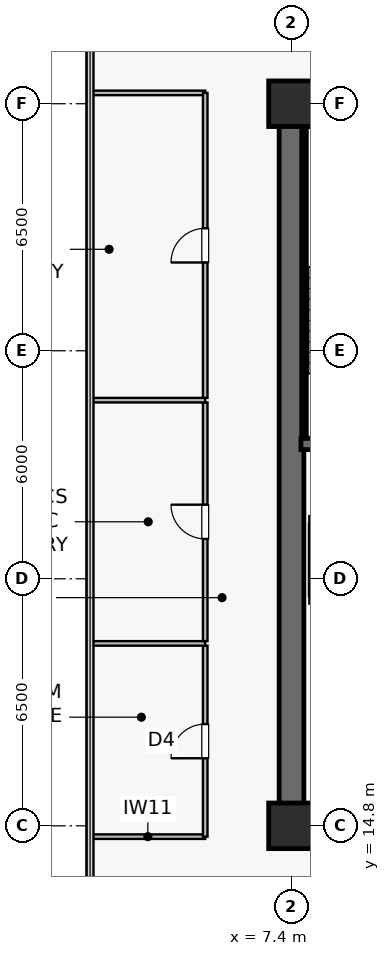
"""IFC4 building model, lengths in metres.
Left out: names, types, materials, properties, quantities, classifications, styles, units other than length and angle.
Written with IfcOpenShell. Run it as: python <this file> out.ifc"""

import sys

from ifc_helpers import new_model, si_unit, direction, frame, frame_2d, origin, origin_2d, place, context, subcontext, project, spatial, rectangle, extrude, source, transform, mapped, element, fill, save


model = new_model("IFC4")
c1 = context("Model", 3, precision=1e-05, world=origin(), true_north=direction((0.0, 1.0)))
c2 = subcontext(c1, "Body", "Model", "MODEL_VIEW")
j1 = project(units=[si_unit("LENGTHUNIT", "METRE"), si_unit("PLANEANGLEUNIT", "RADIAN")], contexts=[c1])
p1 = place(None, origin())
s1 = spatial("IfcSite", under=j1, at=p1, CompositionType="ELEMENT")
p2 = place(p1, origin())
s2 = spatial("IfcBuilding", under=s1, at=p2, CompositionType="ELEMENT")
p3 = place(p2, frame((0.0, 0.0, 178.9)))
s3 = spatial("IfcBuildingStorey", under=s2, at=p3, CompositionType="ELEMENT", Elevation=178.9)
p4 = place(p3, frame((7.075, 14.8, 0.0), z_axis=(0.0, 0.0, 1.0), x_axis=(1.0, 0.0, 0.0)))
e1 = element("IfcWall", 1, at=p4, inside=s3, PredefinedType="SHEAR", context=c2, shape_type="SweptSolid", body=[
    extrude(rectangle(XDim=15.45, YDim=0.65, at=frame_2d((7.725, 0.0))), origin(), (0.0, 0.0, 1.0), 3.79),
])
p5 = place(p3, frame((7.075, 33.8, 0.0), z_axis=(0.0, 0.0, 1.0), x_axis=(1.0, 0.0, 0.0)))
e2 = element("IfcWall", 2, at=p5, inside=s3, PredefinedType="SHEAR", context=c2, shape_type="SweptSolid", body=[
    extrude(rectangle(XDim=15.45, YDim=0.65, at=frame_2d((7.725, 0.0))), origin(), (0.0, 0.0, 1.0), 3.79),
])
p6 = place(p5, frame((6.825, 0.0, 0.0)))
e3 = element("IfcOpeningElement", 3, at=p6, cuts=e2, PredefinedType="OPENING", context=c2, shape_type="SweptSolid", body=[
    extrude(rectangle(XDim=0.95, YDim=2.15, at=frame_2d((0.475, 1.075))), frame((0.0, 0.335, 0.0), z_axis=(0.0, -1.0, 0.0), x_axis=(1.0, 0.0, 0.0)), (0.0, 0.0, 1.0), 0.67),
])
p7 = place(p5, frame((11.89, 0.0, 0.0)))
e4 = element("IfcOpeningElement", 4, at=p7, cuts=e2, PredefinedType="OPENING", context=c2, shape_type="SweptSolid", body=[
    extrude(rectangle(XDim=0.95, YDim=2.15, at=frame_2d((0.475, 1.075))), frame((0.0, 0.335, 0.0), z_axis=(0.0, -1.0, 0.0), x_axis=(1.0, 0.0, 0.0)), (0.0, 0.0, 1.0), 0.67),
])
p8 = place(p3, frame((7.4, 15.125, 0.0), z_axis=(0.0, 0.0, 1.0), x_axis=(0.0, 1.0, 0.0)))
e5 = element("IfcWall", 5, at=p8, inside=s3, PredefinedType="SHEAR", context=c2, shape_type="SweptSolid", body=[
    extrude(rectangle(XDim=18.35, YDim=0.65, at=frame_2d((9.175, 0.0))), origin(), (0.0, 0.0, 1.0), 3.79),
])
p9 = place(p3, frame((7.65, 24.85, 0.0), z_axis=(0.0, 0.0, 1.0), x_axis=(1.0, 0.0, 0.0)))
e6 = element("IfcWall", 6, at=p9, inside=s3, PredefinedType="SHEAR", context=c2, shape_type="SweptSolid", body=[
    extrude(rectangle(XDim=3.8, YDim=0.3, at=frame_2d((1.9, 0.0))), origin(), (0.0, 0.0, 1.0), 3.79),
])
p10 = place(p3, frame((7.73, 33.4, 0.0), z_axis=(0.0, 0.0, 1.0), x_axis=(1.0, 0.0, 0.0)))
e7 = element("IfcWall", 7, at=p10, inside=s3, PredefinedType="SOLIDWALL", context=c2, shape_type="SweptSolid", body=[
    extrude(rectangle(XDim=3.72, YDim=0.12, at=frame_2d((1.86, 0.0))), origin(), (0.0, 0.0, 1.0), 3.79),
])
p11 = place(p3, frame((7.73, 25.0, 0.0), z_axis=(0.0, 0.0, 1.0), x_axis=(0.0, 1.0, 0.0)))
e8 = element("IfcWall", 8, at=p11, inside=s3, PredefinedType="SOLIDWALL", context=c2, shape_type="SweptSolid", body=[
    extrude(rectangle(XDim=8.32, YDim=0.12, at=frame_2d((4.16, 0.0))), origin(), (0.0, 0.0, 1.0), 3.79),
])
m1 = source(origin(), c2, "Body", "SweptSolid", [
    extrude(rectangle(XDim=1.2, YDim=1.2, at=origin_2d()), origin(), (0.0, 0.0, 1.0), 4.1),
])
for number, where, z_axis, x_axis in (
    (9, (7.4, 14.8, 0.0), (0.0, 0.0, 1.0), (1.0, 0.0, 0.0)),
    (10, (7.4, 33.8, 0.0), (0.0, 0.0, 1.0), (1.0, 0.0, 0.0)),
):
    element("IfcColumn", number, at=place(p3, frame(where, z_axis=z_axis, x_axis=x_axis)), inside=s3, PredefinedType="COLUMN", context=c2, shape_type="MappedRepresentation", body=[
        mapped(m1, transform((0.0, 0.0, 0.0), scale=1.0)),
    ])
for number, where, z_axis, x_axis in (
    (11, (7.87, 20.75, 0.0), (0.0, 0.0, 1.0), (1.0, 0.0, 0.0)),
    (12, (7.87, 22.85, 0.0), (0.0, 0.0, 1.0), (1.0, 0.0, 0.0)),
):
    element("IfcWall", number, at=place(p3, frame(where, z_axis=z_axis, x_axis=x_axis)), inside=s3, PredefinedType="SOLIDWALL", context=c2, shape_type="SweptSolid", body=[
        extrude(rectangle(XDim=2.26, YDim=0.2, at=frame_2d((1.13, 0.0))), origin(), (0.0, 0.0, 1.0), 3.79),
    ])
p12 = place(p3, frame((7.95, 20.85, 0.0), z_axis=(0.0, 0.0, 1.0), x_axis=(0.0, 1.0, 0.0)))
e13 = element("IfcWall", 13, at=p12, inside=s3, PredefinedType="SOLIDWALL", context=c2, shape_type="SweptSolid", body=[
    extrude(rectangle(XDim=1.9, YDim=0.18, at=frame_2d((0.95, 0.0))), origin(), (0.0, 0.0, 1.0), 3.79),
])
for number, where, z_axis, x_axis in (
    (14, (2.11, 14.515, 0.0), (0.0, 0.0, 1.0), (1.0, 0.0, 0.0)),
    (15, (2.11, 34.085, 0.0), (0.0, 0.0, 1.0), (1.0, 0.0, 0.0)),
):
    element("IfcWall", number, at=place(p3, frame(where, z_axis=z_axis, x_axis=x_axis)), inside=s3, PredefinedType="PARTITIONING", context=c2, shape_type="SweptSolid", body=[
        extrude(rectangle(XDim=3.02, YDim=0.12, at=frame_2d((1.51, 0.0))), origin(), (0.0, 0.0, 1.0), 3.79),
    ])
p13 = place(p3, frame((5.13, 14.515, 0.0), z_axis=(0.0, 0.0, 1.0), x_axis=(0.0, 1.0, 0.0)))
e16 = element("IfcWall", 16, at=p13, inside=s3, PredefinedType="PARTITIONING", context=c2, shape_type="SweptSolid", body=[
    extrude(rectangle(XDim=5.025, YDim=0.12, at=frame_2d((2.513, 0.0))), origin(), (0.0, 0.0, 1.0), 3.79),
])
p14 = place(p13, frame((2.062, 0.0, 0.0)))
e17 = element("IfcOpeningElement", 17, at=p14, cuts=e16, PredefinedType="OPENING", context=c2, shape_type="SweptSolid", body=[
    extrude(rectangle(XDim=0.9, YDim=2.1, at=frame_2d((0.45, 1.05))), frame((0.0, 0.07, 0.0), z_axis=(0.0, -1.0, 0.0), x_axis=(1.0, 0.0, 0.0)), (0.0, 0.0, 1.0), 0.14),
])
p15 = place(p3, frame((2.11, 19.6, 0.0), z_axis=(0.0, 0.0, 1.0), x_axis=(1.0, 0.0, 0.0)))
e18 = element("IfcWall", 18, at=p15, inside=s3, PredefinedType="PARTITIONING", context=c2, shape_type="SweptSolid", body=[
    extrude(rectangle(XDim=3.02, YDim=0.12, at=frame_2d((1.51, 0.0))), origin(), (0.0, 0.0, 1.0), 3.79),
])
p16 = place(p3, frame((5.13, 19.66, 0.0), z_axis=(0.0, 0.0, 1.0), x_axis=(0.0, 1.0, 0.0)))
e19 = element("IfcWall", 19, at=p16, inside=s3, PredefinedType="PARTITIONING", context=c2, shape_type="SweptSolid", body=[
    extrude(rectangle(XDim=6.28, YDim=0.12, at=frame_2d((3.14, 0.0))), origin(), (0.0, 0.0, 1.0), 3.79),
])
p17 = place(p16, frame((2.69, 0.0, 0.0)))
e20 = element("IfcOpeningElement", 20, at=p17, cuts=e19, PredefinedType="OPENING", context=c2, shape_type="SweptSolid", body=[
    extrude(rectangle(XDim=0.9, YDim=2.1, at=frame_2d((0.45, 1.05))), frame((0.0, 0.07, 0.0), z_axis=(0.0, -1.0, 0.0), x_axis=(1.0, 0.0, 0.0)), (0.0, 0.0, 1.0), 0.14),
])
p18 = place(p3, frame((2.11, 26.0, 0.0), z_axis=(0.0, 0.0, 1.0), x_axis=(1.0, 0.0, 0.0)))
e21 = element("IfcWall", 21, at=p18, inside=s3, PredefinedType="PARTITIONING", context=c2, shape_type="SweptSolid", body=[
    extrude(rectangle(XDim=3.02, YDim=0.12, at=frame_2d((1.51, 0.0))), origin(), (0.0, 0.0, 1.0), 3.79),
])
p19 = place(p3, frame((5.13, 26.06, 0.0), z_axis=(0.0, 0.0, 1.0), x_axis=(0.0, 1.0, 0.0)))
e22 = element("IfcWall", 22, at=p19, inside=s3, PredefinedType="PARTITIONING", context=c2, shape_type="SweptSolid", body=[
    extrude(rectangle(XDim=8.025, YDim=0.12, at=frame_2d((4.012, 0.0))), origin(), (0.0, 0.0, 1.0), 3.79),
])
p20 = place(p19, frame((3.562, 0.0, 0.0)))
e23 = element("IfcOpeningElement", 23, at=p20, cuts=e22, PredefinedType="OPENING", context=c2, shape_type="SweptSolid", body=[
    extrude(rectangle(XDim=0.9, YDim=2.1, at=frame_2d((0.45, 1.05))), frame((0.0, 0.07, 0.0), z_axis=(0.0, -1.0, 0.0), x_axis=(1.0, 0.0, 0.0)), (0.0, 0.0, 1.0), 0.14),
])
m2 = source(origin(), c2, "Body", "SweptSolid", [
    extrude(rectangle(XDim=0.9, YDim=2.1, at=frame_2d((0.45, 1.05))), frame((0.0, 0.025, 0.0), z_axis=(0.0, -1.0, 0.0), x_axis=(1.0, 0.0, 0.0)), (0.0, 0.0, 1.0), 0.05),
])
p21 = place(p14, origin())
e24 = element("IfcDoor", 24, at=p21, inside=s3, OperationType="SINGLE_SWING_LEFT", PredefinedType="DOOR", context=c2, shape_type="MappedRepresentation", body=[
    mapped(m2, transform((0.0, 0.0, 0.0), scale=1.0)),
])
fill(e17, e24)
p22 = place(p17, origin())
e25 = element("IfcDoor", 25, at=p22, inside=s3, OperationType="SINGLE_SWING_RIGHT", PredefinedType="DOOR", context=c2, shape_type="MappedRepresentation", body=[
    mapped(m2, transform((0.0, 0.0, 0.0), scale=1.0)),
])
fill(e20, e25)
p23 = place(p20, origin())
e26 = element("IfcDoor", 26, at=p23, inside=s3, OperationType="SINGLE_SWING_LEFT", PredefinedType="DOOR", context=c2, shape_type="MappedRepresentation", body=[
    mapped(m2, transform((0.0, 0.0, 0.0), scale=1.0)),
])
fill(e23, e26)
save(model, sys.argv[1])
